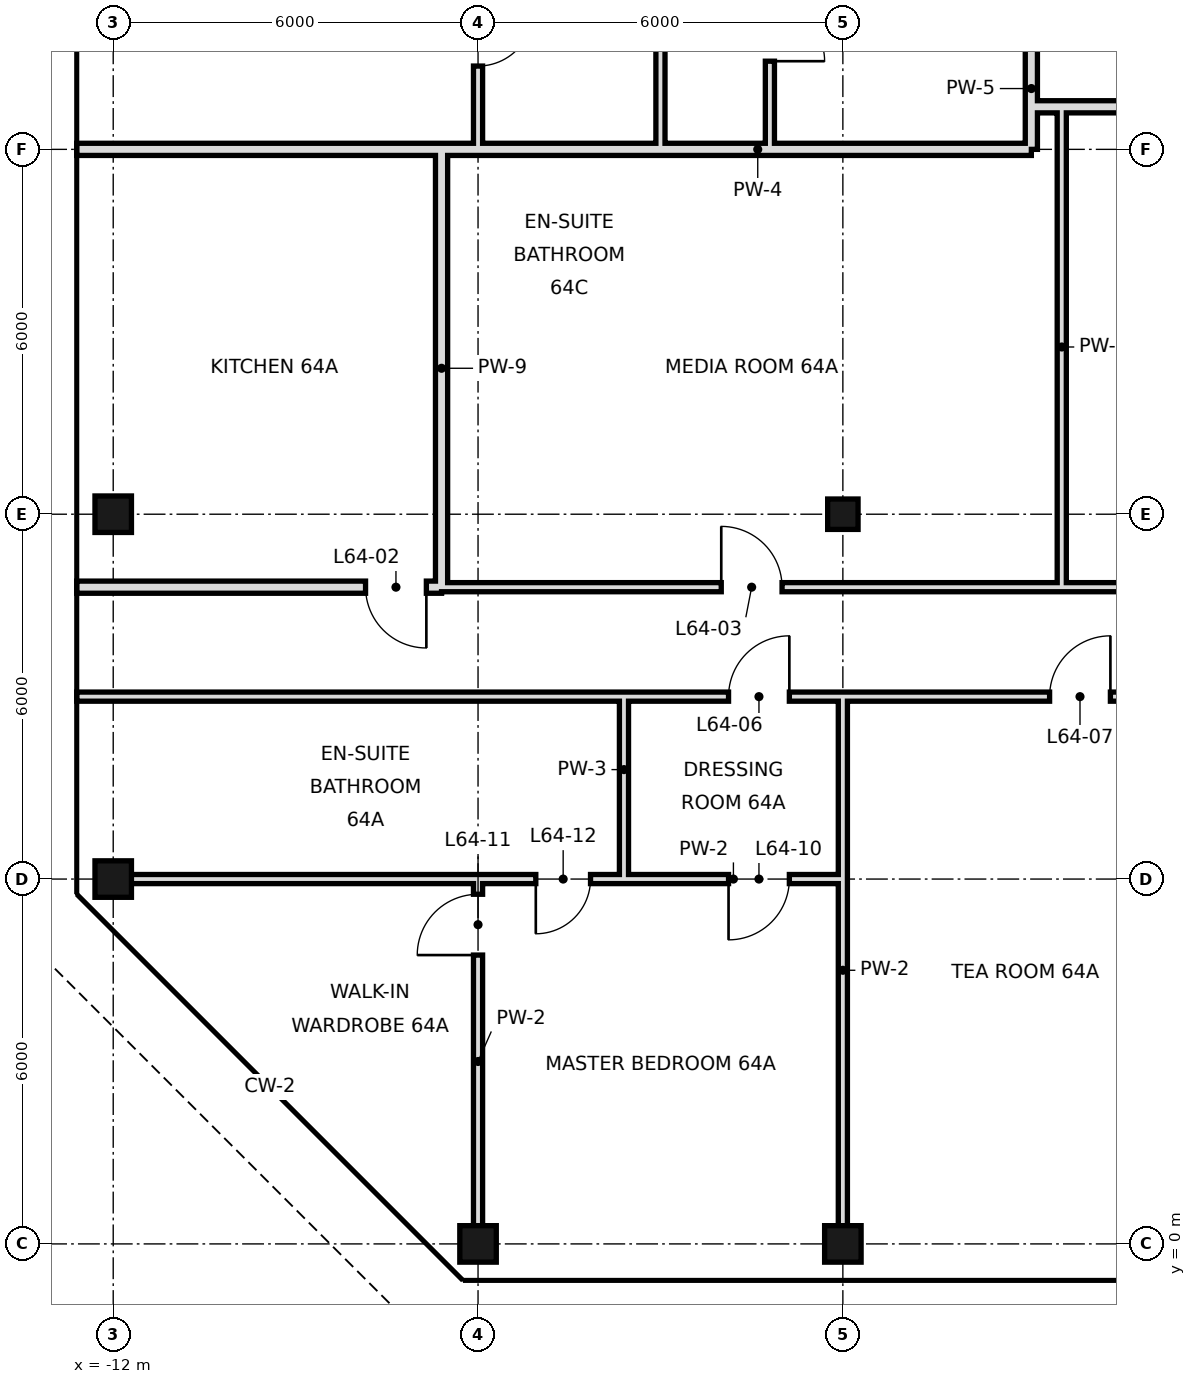
"""IFC4 building model, lengths in metres.
Left out: names, types, materials, properties, quantities, classifications, styles, units other than length and angle.
Written with IfcOpenShell. Run it as: python <this file> out.ifc"""

import sys

from ifc_helpers import new_model, si_unit, direction, frame, frame_2d, origin, origin_2d, place, context, subcontext, project, spatial, rectangle, hollow_rectangle, extrude, element, fill, save


model = new_model("IFC4")
c1 = context("Model", 3, precision=1e-05, world=origin(), true_north=direction((0.0, 1.0)))
c2 = subcontext(c1, "Body", "Model", "MODEL_VIEW")
j1 = project(units=[si_unit("LENGTHUNIT", "METRE"), si_unit("PLANEANGLEUNIT", "RADIAN")], contexts=[c1])
p1 = place(None, origin())
s1 = spatial("IfcSite", under=j1, at=p1, CompositionType="ELEMENT")
p2 = place(p1, origin())
s2 = spatial("IfcBuilding", under=s1, at=p2, CompositionType="ELEMENT")
p3 = place(p2, frame((0.0, 0.0, 270.2)))
s3 = spatial("IfcBuildingStorey", under=s2, at=p3, CompositionType="ELEMENT", Elevation=270.2)
for number, where, z_axis, x_axis in (
    (1, (-12.0, 6.0, 0.0), (0.0, 0.0, 1.0), (1.0, 0.0, 0.0)),
    (2, (-12.0, 12.0, 0.0), (0.0, 0.0, 1.0), (1.0, 0.0, 0.0)),
    (3, (-6.0, 0.0, 0.0), (0.0, 0.0, 1.0), (1.0, 0.0, 0.0)),
    (4, (0.0, 0.0, 0.0), (0.0, 0.0, 1.0), (1.0, 0.0, 0.0)),
):
    element("IfcColumn", number, at=place(p3, frame(where, z_axis=z_axis, x_axis=x_axis)), inside=s3, PredefinedType="COLUMN", context=c2, shape_type="SweptSolid", body=[
        extrude(hollow_rectangle(XDim=0.6, YDim=0.6, WallThickness=0.028, at=origin_2d()), origin(), (0.0, 0.0, 1.0), 3.6),
    ])
p4 = place(p3, frame((0.0, 12.0, 0.0), z_axis=(0.0, 0.0, 1.0), x_axis=(1.0, 0.0, 0.0)))
e5 = element("IfcColumn", 5, at=p4, inside=s3, PredefinedType="COLUMN", context=c2, shape_type="SweptSolid", body=[
    extrude(hollow_rectangle(XDim=0.5, YDim=0.5, WallThickness=0.025, at=origin_2d()), origin(), (0.0, 0.0, 1.0), 3.6),
])
p5 = place(p3, frame((-1.2, 18.0, 0.0), z_axis=(0.0, 0.0, 1.0), x_axis=(0.0, 1.0, 0.0)))
e6 = element("IfcWall", 6, at=p5, inside=s3, PredefinedType="PARTITIONING", context=c2, shape_type="SweptSolid", body=[
    extrude(rectangle(XDim=22.2, YDim=0.15, at=frame_2d((11.1, 0.0))), origin(), (0.0, 0.0, 1.0), 3.42),
])
p6 = place(p5, frame((6.64, 0.0, 0.0)))
e7 = element("IfcOpeningElement", 7, at=p6, cuts=e6, PredefinedType="OPENING", context=c2, shape_type="SweptSolid", body=[
    extrude(rectangle(XDim=1.0, YDim=2.4, at=frame_2d((0.5, 1.2))), frame((0.0, 0.085, 0.0), z_axis=(0.0, -1.0, 0.0), x_axis=(1.0, 0.0, 0.0)), (0.0, 0.0, 1.0), 0.17),
])
p7 = place(p5, frame((1.45, 0.0, 0.0)))
e8 = element("IfcOpeningElement", 8, at=p7, cuts=e6, PredefinedType="OPENING", context=c2, shape_type="SweptSolid", body=[
    extrude(rectangle(XDim=0.9, YDim=2.1, at=frame_2d((0.45, 1.05))), frame((0.0, 0.085, 0.0), z_axis=(0.0, -1.0, 0.0), x_axis=(1.0, 0.0, 0.0)), (0.0, 0.0, 1.0), 0.17),
])
p8 = place(p5, frame((15.7, 0.0, 0.0)))
e9 = element("IfcOpeningElement", 9, at=p8, cuts=e6, PredefinedType="OPENING", context=c2, shape_type="SweptSolid", body=[
    extrude(rectangle(XDim=1.0, YDim=2.4, at=frame_2d((0.5, 1.2))), frame((0.0, 0.085, 0.0), z_axis=(0.0, -1.0, 0.0), x_axis=(1.0, 0.0, 0.0)), (0.0, 0.0, 1.0), 0.17),
])
for number, where, z_axis, x_axis in (
    (10, (-3.0, 18.0, 0.0), (0.0, 0.0, 1.0), (0.0, 1.0, 0.0)),
    (11, (-3.6, 6.0, 0.0), (0.0, 0.0, 1.0), (0.0, 1.0, 0.0)),
):
    element("IfcWall", number, at=place(p3, frame(where, z_axis=z_axis, x_axis=x_axis)), inside=s3, PredefinedType="PARTITIONING", context=c2, shape_type="SweptSolid", body=[
        extrude(rectangle(XDim=3.0, YDim=0.15, at=frame_2d((1.5, 0.0))), origin(), (0.0, 0.0, 1.0), 3.42),
    ])
p9 = place(p3, frame((-6.0, 0.0, 0.0), z_axis=(0.0, 0.0, 1.0), x_axis=(0.0, 1.0, 0.0)))
e12 = element("IfcWall", 12, at=p9, inside=s3, PredefinedType="PARTITIONING", context=c2, shape_type="SweptSolid", body=[
    extrude(rectangle(XDim=6.0, YDim=0.15, at=frame_2d((3.0, 0.0))), origin(), (0.0, 0.0, 1.0), 3.42),
])
p10 = place(p9, frame((4.75, 0.0, 0.0)))
e13 = element("IfcOpeningElement", 13, at=p10, cuts=e12, PredefinedType="OPENING", context=c2, shape_type="SweptSolid", body=[
    extrude(rectangle(XDim=1.0, YDim=2.4, at=frame_2d((0.5, 1.2))), frame((0.0, 0.085, 0.0), z_axis=(0.0, -1.0, 0.0), x_axis=(1.0, 0.0, 0.0)), (0.0, 0.0, 1.0), 0.17),
])
p11 = place(p3, frame((-6.0, 18.0, 0.0), z_axis=(0.0, 0.0, 1.0), x_axis=(0.0, 1.0, 0.0)))
e14 = element("IfcWall", 14, at=p11, inside=s3, PredefinedType="PARTITIONING", context=c2, shape_type="SweptSolid", body=[
    extrude(rectangle(XDim=3.0, YDim=0.15, at=frame_2d((1.5, 0.0))), origin(), (0.0, 0.0, 1.0), 3.42),
])
p12 = place(p11, frame((1.37, 0.0, 0.0)))
e15 = element("IfcOpeningElement", 15, at=p12, cuts=e14, PredefinedType="OPENING", context=c2, shape_type="SweptSolid", body=[
    extrude(rectangle(XDim=0.9, YDim=2.4, at=frame_2d((0.45, 1.2))), frame((0.0, 0.085, 0.0), z_axis=(0.0, -1.0, 0.0), x_axis=(1.0, 0.0, 0.0)), (0.0, 0.0, 1.0), 0.17),
])
p13 = place(p3, frame((-6.6, 10.8, 0.0), z_axis=(0.0, 0.0, 1.0), x_axis=(0.0, 1.0, 0.0)))
e16 = element("IfcWall", 16, at=p13, inside=s3, PredefinedType="SOLIDWALL", context=c2, shape_type="SweptSolid", body=[
    extrude(rectangle(XDim=7.2, YDim=0.2, at=frame_2d((3.6, 0.0))), origin(), (0.0, 0.0, 1.0), 2.72),
])
p14 = place(p3, frame((0.0, 0.0, 0.0), z_axis=(0.0, 0.0, 1.0), x_axis=(0.0, 1.0, 0.0)))
e17 = element("IfcWall", 17, at=p14, inside=s3, PredefinedType="PARTITIONING", context=c2, shape_type="SweptSolid", body=[
    extrude(rectangle(XDim=9.0, YDim=0.15, at=frame_2d((4.5, 0.0))), origin(), (0.0, 0.0, 1.0), 2.72),
])
p15 = place(p3, frame((3.1, 18.7, 0.0), z_axis=(0.0, 0.0, 1.0), x_axis=(0.0, 1.0, 0.0)))
e18 = element("IfcWall", 18, at=p15, inside=s3, PredefinedType="SOLIDWALL", context=c2, shape_type="SweptSolid", body=[
    extrude(rectangle(XDim=21.5, YDim=0.2, at=frame_2d((10.75, 0.0))), origin(), (0.0, 0.0, 1.0), 2.97),
])
p16 = place(p15, frame((6.5, 0.0, 0.0)))
e19 = element("IfcOpeningElement", 19, at=p16, cuts=e18, PredefinedType="OPENING", context=c2, shape_type="SweptSolid", body=[
    extrude(rectangle(XDim=1.2, YDim=2.4, at=frame_2d((0.6, 1.2))), frame((0.0, 0.11, 0.0), z_axis=(0.0, -1.0, 0.0), x_axis=(1.0, 0.0, 0.0)), (0.0, 0.0, 1.0), 0.22),
])
p17 = place(p3, frame((3.1, 18.0, 0.0), z_axis=(0.0, 0.0, 1.0), x_axis=(0.0, 1.0, 0.0)))
e20 = element("IfcWall", 20, at=p17, inside=s3, PredefinedType="SOLIDWALL", context=c2, shape_type="SweptSolid", body=[
    extrude(rectangle(XDim=0.7, YDim=0.2, at=frame_2d((0.35, 0.0))), origin(), (0.0, 0.0, 1.0), 2.97),
])
p18 = place(p3, frame((3.6, 10.8, 0.0), z_axis=(0.0, 0.0, 1.0), x_axis=(0.0, 1.0, 0.0)))
e21 = element("IfcWall", 21, at=p18, inside=s3, PredefinedType="PARTITIONING", context=c2, shape_type="SweptSolid", body=[
    extrude(rectangle(XDim=7.9, YDim=0.15, at=frame_2d((3.95, 0.0))), origin(), (0.0, 0.0, 1.0), 3.42),
])
p19 = place(p3, frame((-12.6, 10.8, 0.0), z_axis=(0.0, 0.0, 1.0), x_axis=(1.0, 0.0, 0.0)))
e22 = element("IfcWall", 22, at=p19, inside=s3, PredefinedType="SOLIDWALL", context=c2, shape_type="SweptSolid", body=[
    extrude(rectangle(XDim=6.0, YDim=0.2, at=frame_2d((3.0, 0.0))), origin(), (0.0, 0.0, 1.0), 2.97),
])
p20 = place(p19, frame((4.75, 0.0, 0.0)))
e23 = element("IfcOpeningElement", 23, at=p20, cuts=e22, PredefinedType="OPENING", context=c2, shape_type="SweptSolid", body=[
    extrude(rectangle(XDim=1.0, YDim=2.4, at=frame_2d((0.5, 1.2))), frame((0.0, 0.11, 0.0), z_axis=(0.0, -1.0, 0.0), x_axis=(1.0, 0.0, 0.0)), (0.0, 0.0, 1.0), 0.22),
])
p21 = place(p3, frame((-6.6, 10.8, 0.0), z_axis=(0.0, 0.0, 1.0), x_axis=(1.0, 0.0, 0.0)))
e24 = element("IfcWall", 24, at=p21, inside=s3, PredefinedType="PARTITIONING", context=c2, shape_type="SweptSolid", body=[
    extrude(rectangle(XDim=28.2, YDim=0.15, at=frame_2d((14.1, 0.0))), origin(), (0.0, 0.0, 1.0), 3.42),
])
p22 = place(p21, frame((25.6, 0.0, 0.0)))
e25 = element("IfcOpeningElement", 25, at=p22, cuts=e24, PredefinedType="OPENING", context=c2, shape_type="SweptSolid", body=[
    extrude(rectangle(XDim=1.0, YDim=2.4, at=frame_2d((0.5, 1.2))), frame((0.0, 0.085, 0.0), z_axis=(0.0, -1.0, 0.0), x_axis=(1.0, 0.0, 0.0)), (0.0, 0.0, 1.0), 0.17),
])
p23 = place(p21, frame((4.6, 0.0, 0.0)))
e26 = element("IfcOpeningElement", 26, at=p23, cuts=e24, PredefinedType="OPENING", context=c2, shape_type="SweptSolid", body=[
    extrude(rectangle(XDim=1.0, YDim=2.4, at=frame_2d((0.5, 1.2))), frame((0.0, 0.085, 0.0), z_axis=(0.0, -1.0, 0.0), x_axis=(1.0, 0.0, 0.0)), (0.0, 0.0, 1.0), 0.17),
])
p24 = place(p21, frame((15.7, 0.0, 0.0)))
e27 = element("IfcOpeningElement", 27, at=p24, cuts=e24, PredefinedType="OPENING", context=c2, shape_type="SweptSolid", body=[
    extrude(rectangle(XDim=1.0, YDim=2.4, at=frame_2d((0.5, 1.2))), frame((0.0, 0.085, 0.0), z_axis=(0.0, -1.0, 0.0), x_axis=(1.0, 0.0, 0.0)), (0.0, 0.0, 1.0), 0.17),
])
p25 = place(p3, frame((-12.6, 18.0, 0.0), z_axis=(0.0, 0.0, 1.0), x_axis=(1.0, 0.0, 0.0)))
e28 = element("IfcWall", 28, at=p25, inside=s3, PredefinedType="SOLIDWALL", context=c2, shape_type="SweptSolid", body=[
    extrude(rectangle(XDim=6.0, YDim=0.2, at=frame_2d((3.0, 0.0))), origin(), (0.0, 0.0, 1.0), 2.72),
])
p26 = place(p3, frame((-6.6, 18.0, 0.0), z_axis=(0.0, 0.0, 1.0), x_axis=(1.0, 0.0, 0.0)))
e29 = element("IfcWall", 29, at=p26, inside=s3, PredefinedType="SOLIDWALL", context=c2, shape_type="SweptSolid", body=[
    extrude(rectangle(XDim=9.7, YDim=0.2, at=frame_2d((4.85, 0.0))), origin(), (0.0, 0.0, 1.0), 2.72),
])
p27 = place(p3, frame((3.1, 18.7, 0.0), z_axis=(0.0, 0.0, 1.0), x_axis=(1.0, 0.0, 0.0)))
e30 = element("IfcWall", 30, at=p27, inside=s3, PredefinedType="SOLIDWALL", context=c2, shape_type="SweptSolid", body=[
    extrude(rectangle(XDim=20.9, YDim=0.2, at=frame_2d((10.45, 0.0))), origin(), (0.0, 0.0, 1.0), 2.72),
])
p28 = place(p27, frame((14.9, 0.0, 0.0)))
e31 = element("IfcOpeningElement", 31, at=p28, cuts=e30, PredefinedType="OPENING", context=c2, shape_type="SweptSolid", body=[
    extrude(rectangle(XDim=1.2, YDim=2.4, at=frame_2d((0.6, 1.2))), frame((0.0, 0.11, 0.0), z_axis=(0.0, -1.0, 0.0), x_axis=(1.0, 0.0, 0.0)), (0.0, 0.0, 1.0), 0.22),
])
p29 = place(p3, frame((-3.6, 6.0, 0.0), z_axis=(0.0, 0.0, 1.0), x_axis=(1.0, 0.0, 0.0)))
e32 = element("IfcWall", 32, at=p29, inside=s3, PredefinedType="PARTITIONING", context=c2, shape_type="SweptSolid", body=[
    extrude(rectangle(XDim=3.6, YDim=0.15, at=frame_2d((1.8, 0.0))), origin(), (0.0, 0.0, 1.0), 2.72),
])
p30 = place(p29, frame((1.72, 0.0, 0.0)))
e33 = element("IfcOpeningElement", 33, at=p30, cuts=e32, PredefinedType="OPENING", context=c2, shape_type="SweptSolid", body=[
    extrude(rectangle(XDim=1.0, YDim=2.4, at=frame_2d((0.5, 1.2))), frame((0.0, 0.085, 0.0), z_axis=(0.0, -1.0, 0.0), x_axis=(1.0, 0.0, 0.0)), (0.0, 0.0, 1.0), 0.17),
])
p31 = place(p3, frame((-12.0, 6.0, 0.0), z_axis=(0.0, 0.0, 1.0), x_axis=(1.0, 0.0, 0.0)))
e34 = element("IfcWall", 34, at=p31, inside=s3, PredefinedType="PARTITIONING", context=c2, shape_type="SweptSolid", body=[
    extrude(rectangle(XDim=8.4, YDim=0.15, at=frame_2d((4.2, 0.0))), origin(), (0.0, 0.0, 1.0), 2.72),
])
p32 = place(p31, frame((6.95, 0.0, 0.0)))
e35 = element("IfcOpeningElement", 35, at=p32, cuts=e34, PredefinedType="OPENING", context=c2, shape_type="SweptSolid", body=[
    extrude(rectangle(XDim=0.9, YDim=2.4, at=frame_2d((0.45, 1.2))), frame((0.0, 0.085, 0.0), z_axis=(0.0, -1.0, 0.0), x_axis=(1.0, 0.0, 0.0)), (0.0, 0.0, 1.0), 0.17),
])
p33 = place(p3, frame((-3.6, 9.0, 0.0), z_axis=(0.0, 0.0, 1.0), x_axis=(1.0, 0.0, 0.0)))
e36 = element("IfcWall", 36, at=p33, inside=s3, PredefinedType="PARTITIONING", context=c2, shape_type="SweptSolid", body=[
    extrude(rectangle(XDim=25.2, YDim=0.15, at=frame_2d((12.6, 0.0))), origin(), (0.0, 0.0, 1.0), 3.42),
])
p34 = place(p33, frame((1.72, 0.0, 0.0)))
e37 = element("IfcOpeningElement", 37, at=p34, cuts=e36, PredefinedType="OPENING", context=c2, shape_type="SweptSolid", body=[
    extrude(rectangle(XDim=1.0, YDim=2.4, at=frame_2d((0.5, 1.2))), frame((0.0, 0.085, 0.0), z_axis=(0.0, -1.0, 0.0), x_axis=(1.0, 0.0, 0.0)), (0.0, 0.0, 1.0), 0.17),
])
p35 = place(p33, frame((7.0, 0.0, 0.0)))
e38 = element("IfcOpeningElement", 38, at=p35, cuts=e36, PredefinedType="OPENING", context=c2, shape_type="SweptSolid", body=[
    extrude(rectangle(XDim=1.0, YDim=2.4, at=frame_2d((0.5, 1.2))), frame((0.0, 0.085, 0.0), z_axis=(0.0, -1.0, 0.0), x_axis=(1.0, 0.0, 0.0)), (0.0, 0.0, 1.0), 0.17),
])
p36 = place(p33, frame((12.76, 0.0, 0.0)))
e39 = element("IfcOpeningElement", 39, at=p36, cuts=e36, PredefinedType="OPENING", context=c2, shape_type="SweptSolid", body=[
    extrude(rectangle(XDim=1.8, YDim=2.4, at=frame_2d((0.9, 1.2))), frame((0.0, 0.085, 0.0), z_axis=(0.0, -1.0, 0.0), x_axis=(1.0, 0.0, 0.0)), (0.0, 0.0, 1.0), 0.17),
])
p37 = place(p33, frame((22.48, 0.0, 0.0)))
e40 = element("IfcOpeningElement", 40, at=p37, cuts=e36, PredefinedType="OPENING", context=c2, shape_type="SweptSolid", body=[
    extrude(rectangle(XDim=1.0, YDim=2.4, at=frame_2d((0.5, 1.2))), frame((0.0, 0.085, 0.0), z_axis=(0.0, -1.0, 0.0), x_axis=(1.0, 0.0, 0.0)), (0.0, 0.0, 1.0), 0.17),
])
p38 = place(p3, frame((-12.6, 9.0, 0.0), z_axis=(0.0, 0.0, 1.0), x_axis=(1.0, 0.0, 0.0)))
e41 = element("IfcWall", 41, at=p38, inside=s3, PredefinedType="PARTITIONING", context=c2, shape_type="SweptSolid", body=[
    extrude(rectangle(XDim=9.0, YDim=0.15, at=frame_2d((4.5, 0.0))), origin(), (0.0, 0.0, 1.0), 3.42),
])
p39 = place(p20, origin())
e42 = element("IfcDoor", 42, at=p39, inside=s3, OperationType="SINGLE_SWING_RIGHT", PredefinedType="DOOR", context=c2, shape_type="SweptSolid", body=[
    extrude(rectangle(XDim=1.0, YDim=2.4, at=frame_2d((0.5, 1.2))), frame((0.0, 0.025, 0.0), z_axis=(0.0, -1.0, 0.0), x_axis=(1.0, 0.0, 0.0)), (0.0, 0.0, 1.0), 0.05),
])
fill(e23, e42)
p40 = place(p23, origin())
e43 = element("IfcDoor", 43, at=p40, inside=s3, OperationType="SINGLE_SWING_LEFT", PredefinedType="DOOR", context=c2, shape_type="SweptSolid", body=[
    extrude(rectangle(XDim=1.0, YDim=2.4, at=frame_2d((0.5, 1.2))), frame((0.0, 0.025, 0.0), z_axis=(0.0, -1.0, 0.0), x_axis=(1.0, 0.0, 0.0)), (0.0, 0.0, 1.0), 0.05),
])
fill(e26, e43)
p41 = place(p34, frame((1.0, 0.0, 0.0), z_axis=(0.0, 0.0, 1.0), x_axis=(-1.0, 0.0, 0.0)))
e44 = element("IfcDoor", 44, at=p41, inside=s3, OperationType="SINGLE_SWING_LEFT", PredefinedType="DOOR", context=c2, shape_type="SweptSolid", body=[
    extrude(rectangle(XDim=1.0, YDim=2.4, at=frame_2d((0.5, 1.2))), frame((0.0, 0.025, 0.0), z_axis=(0.0, -1.0, 0.0), x_axis=(1.0, 0.0, 0.0)), (0.0, 0.0, 1.0), 0.05),
])
fill(e37, e44)
p42 = place(p35, frame((1.0, 0.0, 0.0), z_axis=(0.0, 0.0, 1.0), x_axis=(-1.0, 0.0, 0.0)))
e45 = element("IfcDoor", 45, at=p42, inside=s3, OperationType="SINGLE_SWING_LEFT", PredefinedType="DOOR", context=c2, shape_type="SweptSolid", body=[
    extrude(rectangle(XDim=1.0, YDim=2.4, at=frame_2d((0.5, 1.2))), frame((0.0, 0.025, 0.0), z_axis=(0.0, -1.0, 0.0), x_axis=(1.0, 0.0, 0.0)), (0.0, 0.0, 1.0), 0.05),
])
fill(e38, e45)
p43 = place(p30, frame((1.0, 0.0, 0.0), z_axis=(0.0, 0.0, 1.0), x_axis=(-1.0, 0.0, 0.0)))
e46 = element("IfcDoor", 46, at=p43, inside=s3, OperationType="SINGLE_SWING_RIGHT", PredefinedType="DOOR", context=c2, shape_type="SweptSolid", body=[
    extrude(rectangle(XDim=1.0, YDim=2.4, at=frame_2d((0.5, 1.2))), frame((0.0, 0.025, 0.0), z_axis=(0.0, -1.0, 0.0), x_axis=(1.0, 0.0, 0.0)), (0.0, 0.0, 1.0), 0.05),
])
fill(e33, e46)
p44 = place(p10, origin())
e47 = element("IfcDoor", 47, at=p44, inside=s3, OperationType="SINGLE_SWING_LEFT", PredefinedType="DOOR", context=c2, shape_type="SweptSolid", body=[
    extrude(rectangle(XDim=1.0, YDim=2.4, at=frame_2d((0.5, 1.2))), frame((0.0, 0.025, 0.0), z_axis=(0.0, -1.0, 0.0), x_axis=(1.0, 0.0, 0.0)), (0.0, 0.0, 1.0), 0.05),
])
fill(e13, e47)
p45 = place(p32, frame((0.9, 0.0, 0.0), z_axis=(0.0, 0.0, 1.0), x_axis=(-1.0, 0.0, 0.0)))
e48 = element("IfcDoor", 48, at=p45, inside=s3, OperationType="SINGLE_SWING_RIGHT", PredefinedType="DOOR", context=c2, shape_type="SweptSolid", body=[
    extrude(rectangle(XDim=0.9, YDim=2.4, at=frame_2d((0.45, 1.2))), frame((0.0, 0.025, 0.0), z_axis=(0.0, -1.0, 0.0), x_axis=(1.0, 0.0, 0.0)), (0.0, 0.0, 1.0), 0.05),
])
fill(e35, e48)
p46 = place(p7, frame((0.9, 0.0, 0.0), z_axis=(0.0, 0.0, 1.0), x_axis=(-1.0, 0.0, 0.0)))
e49 = element("IfcDoor", 49, at=p46, inside=s3, OperationType="SINGLE_SWING_RIGHT", PredefinedType="DOOR", context=c2, shape_type="SweptSolid", body=[
    extrude(rectangle(XDim=0.9, YDim=2.1, at=frame_2d((0.45, 1.05))), frame((0.0, 0.025, 0.0), z_axis=(0.0, -1.0, 0.0), x_axis=(1.0, 0.0, 0.0)), (0.0, 0.0, 1.0), 0.05),
])
fill(e8, e49)
p47 = place(p12, origin())
e50 = element("IfcDoor", 50, at=p47, inside=s3, OperationType="SINGLE_SWING_RIGHT", PredefinedType="DOOR", context=c2, shape_type="SweptSolid", body=[
    extrude(rectangle(XDim=0.9, YDim=2.4, at=frame_2d((0.45, 1.2))), frame((0.0, 0.025, 0.0), z_axis=(0.0, -1.0, 0.0), x_axis=(1.0, 0.0, 0.0)), (0.0, 0.0, 1.0), 0.05),
])
fill(e15, e50)
save(model, sys.argv[1])
